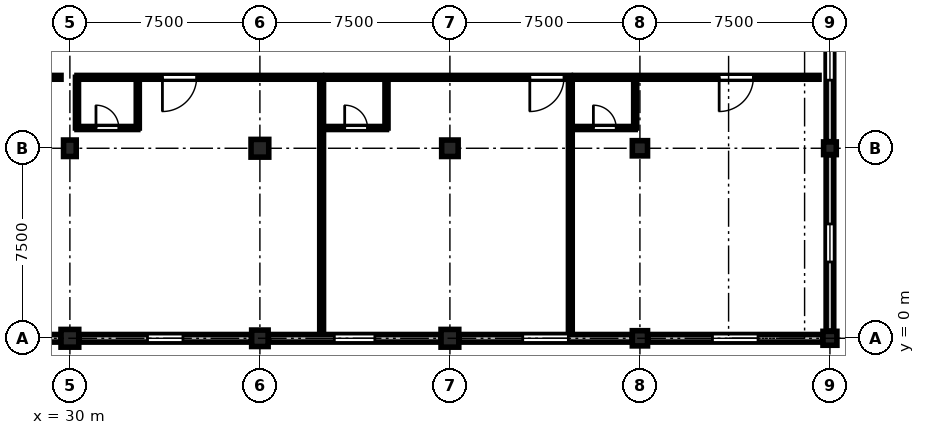
"""IFC4 building model, lengths in metres.
Left out: names, types, materials, properties, quantities, classifications, styles, units other than length and angle.
Written with IfcOpenShell. Run it as: python <this file> out.ifc"""

import sys

from ifc_helpers import new_model, si_unit, direction, frame, frame_2d, origin, origin_2d, place, context, subcontext, project, spatial, rectangle, extrude, element, fill, save


model = new_model("IFC4")
c1 = context("Model", 3, precision=1e-05, world=origin(), true_north=direction((0.0, 1.0)))
c2 = subcontext(c1, "Body", "Model", "MODEL_VIEW")
j1 = project(units=[si_unit("LENGTHUNIT", "METRE"), si_unit("PLANEANGLEUNIT", "RADIAN")], contexts=[c1])
p1 = place(None, origin())
s1 = spatial("IfcSite", under=j1, at=p1, CompositionType="ELEMENT")
p2 = place(p1, origin())
s2 = spatial("IfcBuilding", under=s1, at=p2, CompositionType="ELEMENT")
p3 = place(p2, frame((0.0, 0.0, 14.1)))
s3 = spatial("IfcBuildingStorey", under=s2, at=p3, CompositionType="ELEMENT", Elevation=14.1)
p4 = place(p3, frame((30.0, 0.0, 0.0), z_axis=(0.0, 0.0, 1.0), x_axis=(1.0, 0.0, 0.0)))
e1 = element("IfcColumn", 1, at=p4, inside=s3, PredefinedType="COLUMN", context=c2, shape_type="SweptSolid", body=[
    extrude(rectangle(XDim=0.7, YDim=0.7, at=origin_2d()), origin(), (0.0, 0.0, 1.0), 3.75),
])
p5 = place(p3, frame((30.0, 7.5, 0.0), z_axis=(0.0, 0.0, 1.0), x_axis=(1.0, 0.0, 0.0)))
e2 = element("IfcColumn", 2, at=p5, inside=s3, PredefinedType="COLUMN", context=c2, shape_type="SweptSolid", body=[
    extrude(rectangle(XDim=0.5, YDim=0.65, at=origin_2d()), origin(), (0.0, 0.0, 1.0), 3.75),
])
p6 = place(p3, frame((37.5, 0.0, 0.0), z_axis=(0.0, 0.0, 1.0), x_axis=(1.0, 0.0, 0.0)))
e3 = element("IfcColumn", 3, at=p6, inside=s3, PredefinedType="COLUMN", context=c2, shape_type="SweptSolid", body=[
    extrude(rectangle(XDim=0.65, YDim=0.65, at=origin_2d()), origin(), (0.0, 0.0, 1.0), 3.75),
])
for number, where, z_axis, x_axis in (
    (4, (37.5, 7.5, 0.0), (0.0, 0.0, 1.0), (1.0, 0.0, 0.0)),
    (5, (45.0, 0.0, 0.0), (0.0, 0.0, 1.0), (1.0, 0.0, 0.0)),
):
    element("IfcColumn", number, at=place(p3, frame(where, z_axis=z_axis, x_axis=x_axis)), inside=s3, PredefinedType="COLUMN", context=c2, shape_type="SweptSolid", body=[
        extrude(rectangle(XDim=0.7, YDim=0.7, at=origin_2d()), origin(), (0.0, 0.0, 1.0), 3.75),
    ])
p7 = place(p3, frame((45.0, 7.5, 0.0), z_axis=(0.0, 0.0, 1.0), x_axis=(1.0, 0.0, 0.0)))
e6 = element("IfcColumn", 6, at=p7, inside=s3, PredefinedType="COLUMN", context=c2, shape_type="SweptSolid", body=[
    extrude(rectangle(XDim=0.65, YDim=0.65, at=origin_2d()), origin(), (0.0, 0.0, 1.0), 3.75),
])
for number, where, z_axis, x_axis in (
    (7, (52.5, 0.0, 0.0), (0.0, 0.0, 1.0), (1.0, 0.0, 0.0)),
    (8, (52.5, 7.5, 0.0), (0.0, 0.0, 1.0), (1.0, 0.0, 0.0)),
):
    element("IfcColumn", number, at=place(p3, frame(where, z_axis=z_axis, x_axis=x_axis)), inside=s3, PredefinedType="COLUMN", context=c2, shape_type="SweptSolid", body=[
        extrude(rectangle(XDim=0.6, YDim=0.6, at=origin_2d()), origin(), (0.0, 0.0, 1.0), 3.75),
    ])
p8 = place(p3, frame((60.0, 0.0, 0.0), z_axis=(0.0, 0.0, 1.0), x_axis=(1.0, 0.0, 0.0)))
e9 = element("IfcColumn", 9, at=p8, inside=s3, PredefinedType="COLUMN", context=c2, shape_type="SweptSolid", body=[
    extrude(rectangle(XDim=0.55, YDim=0.55, at=origin_2d()), origin(), (0.0, 0.0, 1.0), 3.75),
])
p9 = place(p3, frame((60.0, 7.5, 0.0), z_axis=(0.0, 0.0, 1.0), x_axis=(1.0, 0.0, 0.0)))
e10 = element("IfcColumn", 10, at=p9, inside=s3, PredefinedType="COLUMN", context=c2, shape_type="SweptSolid", body=[
    extrude(rectangle(XDim=0.5, YDim=0.5, at=origin_2d()), origin(), (0.0, 0.0, 1.0), 3.75),
])
p10 = place(p3, frame((29.64, 0.0, 0.0), z_axis=(0.0, 0.0, 1.0), x_axis=(-1.0, 0.0, 0.0)))
e11 = element("IfcWall", 11, at=p10, inside=s3, PredefinedType="STANDARD", context=c2, shape_type="SweptSolid", body=[
    extrude(rectangle(XDim=6.805, YDim=0.3, at=frame_2d((3.402, 0.0))), origin(), (0.0, 0.0, 1.0), 2.87),
])
p11 = place(p10, frame((2.302, 0.0, 0.9)))
e12 = element("IfcOpeningElement", 12, at=p11, cuts=e11, PredefinedType="OPENING", context=c2, shape_type="SweptSolid", body=[
    extrude(rectangle(XDim=2.2, YDim=1.69, at=frame_2d((1.1, 0.845))), frame((0.0, 0.16, 0.0), z_axis=(0.0, -1.0, 0.0), x_axis=(1.0, 0.0, 0.0)), (0.0, 0.0, 1.0), 0.32),
])
p12 = place(p3, frame((37.165, 0.0, 0.0), z_axis=(0.0, 0.0, 1.0), x_axis=(-1.0, 0.0, 0.0)))
e13 = element("IfcWall", 13, at=p12, inside=s3, PredefinedType="STANDARD", context=c2, shape_type="SweptSolid", body=[
    extrude(rectangle(XDim=6.805, YDim=0.3, at=frame_2d((3.402, 0.0))), origin(), (0.0, 0.0, 1.0), 2.87),
])
p13 = place(p12, frame((2.702, 0.0, 0.9)))
e14 = element("IfcOpeningElement", 14, at=p13, cuts=e13, PredefinedType="OPENING", context=c2, shape_type="SweptSolid", body=[
    extrude(rectangle(XDim=1.4, YDim=1.69, at=frame_2d((0.7, 0.845))), frame((0.0, 0.16, 0.0), z_axis=(0.0, -1.0, 0.0), x_axis=(1.0, 0.0, 0.0)), (0.0, 0.0, 1.0), 0.32),
])
p14 = place(p3, frame((44.64, 0.0, 0.0), z_axis=(0.0, 0.0, 1.0), x_axis=(-1.0, 0.0, 0.0)))
e15 = element("IfcWall", 15, at=p14, inside=s3, PredefinedType="STANDARD", context=c2, shape_type="SweptSolid", body=[
    extrude(rectangle(XDim=6.805, YDim=0.3, at=frame_2d((3.402, 0.0))), origin(), (0.0, 0.0, 1.0), 2.87),
])
p15 = place(p14, frame((2.603, 0.0, 0.9)))
e16 = element("IfcOpeningElement", 16, at=p15, cuts=e15, PredefinedType="OPENING", context=c2, shape_type="SweptSolid", body=[
    extrude(rectangle(XDim=1.6, YDim=1.69, at=frame_2d((0.8, 0.845))), frame((0.0, 0.16, 0.0), z_axis=(0.0, -1.0, 0.0), x_axis=(1.0, 0.0, 0.0)), (0.0, 0.0, 1.0), 0.32),
])
p16 = place(p3, frame((52.19, 0.0, 0.0), z_axis=(0.0, 0.0, 1.0), x_axis=(-1.0, 0.0, 0.0)))
e17 = element("IfcWall", 17, at=p16, inside=s3, PredefinedType="STANDARD", context=c2, shape_type="SweptSolid", body=[
    extrude(rectangle(XDim=6.83, YDim=0.3, at=frame_2d((3.415, 0.0))), origin(), (0.0, 0.0, 1.0), 2.87),
])
p17 = place(p16, frame((2.515, 0.0, 0.9)))
e18 = element("IfcOpeningElement", 18, at=p17, cuts=e17, PredefinedType="OPENING", context=c2, shape_type="SweptSolid", body=[
    extrude(rectangle(XDim=1.8, YDim=1.69, at=frame_2d((0.9, 0.845))), frame((0.0, 0.16, 0.0), z_axis=(0.0, -1.0, 0.0), x_axis=(1.0, 0.0, 0.0)), (0.0, 0.0, 1.0), 0.32),
])
p18 = place(p3, frame((59.715, 0.0, 0.0), z_axis=(0.0, 0.0, 1.0), x_axis=(-1.0, 0.0, 0.0)))
e19 = element("IfcWall", 19, at=p18, inside=s3, PredefinedType="STANDARD", context=c2, shape_type="SweptSolid", body=[
    extrude(rectangle(XDim=6.905, YDim=0.3, at=frame_2d((3.453, 0.0))), origin(), (0.0, 0.0, 1.0), 2.87),
])
p19 = place(p18, frame((2.552, 0.0, 0.9)))
e20 = element("IfcOpeningElement", 20, at=p19, cuts=e19, PredefinedType="OPENING", context=c2, shape_type="SweptSolid", body=[
    extrude(rectangle(XDim=1.8, YDim=1.69, at=frame_2d((0.9, 0.845))), frame((0.0, 0.16, 0.0), z_axis=(0.0, -1.0, 0.0), x_axis=(1.0, 0.0, 0.0)), (0.0, 0.0, 1.0), 0.32),
])
p20 = place(p3, frame((60.0, 7.24, 0.0), z_axis=(0.0, 0.0, 1.0), x_axis=(0.0, -1.0, 0.0)))
e21 = element("IfcWall", 21, at=p20, inside=s3, PredefinedType="STANDARD", context=c2, shape_type="SweptSolid", body=[
    extrude(rectangle(XDim=6.955, YDim=0.3, at=frame_2d((3.478, 0.0))), origin(), (0.0, 0.0, 1.0), 2.87),
])
p21 = place(p20, frame((2.728, 0.0, 0.9)))
e22 = element("IfcOpeningElement", 22, at=p21, cuts=e21, PredefinedType="OPENING", context=c2, shape_type="SweptSolid", body=[
    extrude(rectangle(XDim=1.5, YDim=1.69, at=frame_2d((0.75, 0.845))), frame((0.0, 0.16, 0.0), z_axis=(0.0, -1.0, 0.0), x_axis=(1.0, 0.0, 0.0)), (0.0, 0.0, 1.0), 0.32),
])
p22 = place(p3, frame((60.0, 14.715, 0.0), z_axis=(0.0, 0.0, 1.0), x_axis=(0.0, -1.0, 0.0)))
e23 = element("IfcWall", 23, at=p22, inside=s3, PredefinedType="STANDARD", context=c2, shape_type="SweptSolid", body=[
    extrude(rectangle(XDim=6.955, YDim=0.3, at=frame_2d((3.478, 0.0))), origin(), (0.0, 0.0, 1.0), 2.87),
])
p23 = place(p22, frame((2.427, 0.0, 0.9)))
e24 = element("IfcOpeningElement", 24, at=p23, cuts=e23, PredefinedType="OPENING", context=c2, shape_type="SweptSolid", body=[
    extrude(rectangle(XDim=2.1, YDim=1.69, at=frame_2d((1.05, 0.845))), frame((0.0, 0.16, 0.0), z_axis=(0.0, -1.0, 0.0), x_axis=(1.0, 0.0, 0.0)), (0.0, 0.0, 1.0), 0.32),
])
p24 = place(p3, frame((39.937, 10.3, 0.0), z_axis=(0.0, 0.0, 1.0), x_axis=(-1.0, 0.0, 0.0)))
e25 = element("IfcWall", 25, at=p24, inside=s3, PredefinedType="PARTITIONING", context=c2, shape_type="SweptSolid", body=[
    extrude(rectangle(XDim=9.657, YDim=0.15, at=frame_2d((4.828, 0.0))), origin(), (0.0, 0.0, 1.0), 3.455),
])
p25 = place(p24, frame((4.934, 0.0, 0.0)))
e26 = element("IfcOpeningElement", 26, at=p25, cuts=e25, PredefinedType="OPENING", context=c2, shape_type="SweptSolid", body=[
    extrude(rectangle(XDim=1.35, YDim=2.25, at=frame_2d((0.675, 1.125))), frame((0.0, 0.085, 0.0), z_axis=(0.0, -1.0, 0.0), x_axis=(1.0, 0.0, 0.0)), (0.0, 0.0, 1.0), 0.17),
])
p26 = place(p3, frame((30.28, 8.3, 0.0), z_axis=(0.0, 0.0, 1.0), x_axis=(1.0, 0.0, 0.0)))
e27 = element("IfcWall", 27, at=p26, inside=s3, PredefinedType="PARTITIONING", context=c2, shape_type="SweptSolid", body=[
    extrude(rectangle(XDim=2.4, YDim=0.12, at=frame_2d((1.2, 0.0))), origin(), (0.0, 0.0, 1.0), 3.455),
])
p27 = place(p26, frame((0.75, 0.0, 0.0)))
e28 = element("IfcOpeningElement", 28, at=p27, cuts=e27, PredefinedType="OPENING", context=c2, shape_type="SweptSolid", body=[
    extrude(rectangle(XDim=0.9, YDim=2.1, at=frame_2d((0.45, 1.05))), frame((0.0, 0.07, 0.0), z_axis=(0.0, -1.0, 0.0), x_axis=(1.0, 0.0, 0.0)), (0.0, 0.0, 1.0), 0.14),
])
p28 = place(p3, frame((32.68, 8.3, 0.0), z_axis=(0.0, 0.0, 1.0), x_axis=(0.0, 1.0, 0.0)))
e29 = element("IfcWall", 29, at=p28, inside=s3, PredefinedType="PARTITIONING", context=c2, shape_type="SweptSolid", body=[
    extrude(rectangle(XDim=2.0, YDim=0.12, at=frame_2d((1.0, 0.0))), origin(), (0.0, 0.0, 1.0), 3.455),
])
p29 = place(p3, frame((49.753, 10.3, 0.0), z_axis=(0.0, 0.0, 1.0), x_axis=(-1.0, 0.0, 0.0)))
e30 = element("IfcWall", 30, at=p29, inside=s3, PredefinedType="PARTITIONING", context=c2, shape_type="SweptSolid", body=[
    extrude(rectangle(XDim=9.657, YDim=0.15, at=frame_2d((4.828, 0.0))), origin(), (0.0, 0.0, 1.0), 3.455),
])
p30 = place(p29, frame((0.25, 0.0, 0.0)))
e31 = element("IfcOpeningElement", 31, at=p30, cuts=e30, PredefinedType="OPENING", context=c2, shape_type="SweptSolid", body=[
    extrude(rectangle(XDim=1.35, YDim=2.25, at=frame_2d((0.675, 1.125))), frame((0.0, 0.085, 0.0), z_axis=(0.0, -1.0, 0.0), x_axis=(1.0, 0.0, 0.0)), (0.0, 0.0, 1.0), 0.17),
])
p31 = place(p3, frame((40.097, 8.3, 0.0), z_axis=(0.0, 0.0, 1.0), x_axis=(1.0, 0.0, 0.0)))
e32 = element("IfcWall", 32, at=p31, inside=s3, PredefinedType="PARTITIONING", context=c2, shape_type="SweptSolid", body=[
    extrude(rectangle(XDim=2.4, YDim=0.12, at=frame_2d((1.2, 0.0))), origin(), (0.0, 0.0, 1.0), 3.455),
])
p32 = place(p31, frame((0.75, 0.0, 0.0)))
e33 = element("IfcOpeningElement", 33, at=p32, cuts=e32, PredefinedType="OPENING", context=c2, shape_type="SweptSolid", body=[
    extrude(rectangle(XDim=0.9, YDim=2.1, at=frame_2d((0.45, 1.05))), frame((0.0, 0.07, 0.0), z_axis=(0.0, -1.0, 0.0), x_axis=(1.0, 0.0, 0.0)), (0.0, 0.0, 1.0), 0.14),
])
p33 = place(p3, frame((42.497, 8.3, 0.0), z_axis=(0.0, 0.0, 1.0), x_axis=(0.0, 1.0, 0.0)))
e34 = element("IfcWall", 34, at=p33, inside=s3, PredefinedType="PARTITIONING", context=c2, shape_type="SweptSolid", body=[
    extrude(rectangle(XDim=2.0, YDim=0.12, at=frame_2d((1.0, 0.0))), origin(), (0.0, 0.0, 1.0), 3.455),
])
p34 = place(p3, frame((59.57, 10.3, 0.0), z_axis=(0.0, 0.0, 1.0), x_axis=(-1.0, 0.0, 0.0)))
e35 = element("IfcWall", 35, at=p34, inside=s3, PredefinedType="PARTITIONING", context=c2, shape_type="SweptSolid", body=[
    extrude(rectangle(XDim=9.657, YDim=0.15, at=frame_2d((4.828, 0.0))), origin(), (0.0, 0.0, 1.0), 3.455),
])
p35 = place(p34, frame((2.592, 0.0, 0.0)))
e36 = element("IfcOpeningElement", 36, at=p35, cuts=e35, PredefinedType="OPENING", context=c2, shape_type="SweptSolid", body=[
    extrude(rectangle(XDim=1.35, YDim=2.25, at=frame_2d((0.675, 1.125))), frame((0.0, 0.085, 0.0), z_axis=(0.0, -1.0, 0.0), x_axis=(1.0, 0.0, 0.0)), (0.0, 0.0, 1.0), 0.17),
])
p36 = place(p3, frame((49.913, 8.3, 0.0), z_axis=(0.0, 0.0, 1.0), x_axis=(1.0, 0.0, 0.0)))
e37 = element("IfcWall", 37, at=p36, inside=s3, PredefinedType="PARTITIONING", context=c2, shape_type="SweptSolid", body=[
    extrude(rectangle(XDim=2.4, YDim=0.12, at=frame_2d((1.2, 0.0))), origin(), (0.0, 0.0, 1.0), 3.455),
])
p37 = place(p36, frame((0.75, 0.0, 0.0)))
e38 = element("IfcOpeningElement", 38, at=p37, cuts=e37, PredefinedType="OPENING", context=c2, shape_type="SweptSolid", body=[
    extrude(rectangle(XDim=0.9, YDim=2.1, at=frame_2d((0.45, 1.05))), frame((0.0, 0.07, 0.0), z_axis=(0.0, -1.0, 0.0), x_axis=(1.0, 0.0, 0.0)), (0.0, 0.0, 1.0), 0.14),
])
p38 = place(p3, frame((52.313, 8.3, 0.0), z_axis=(0.0, 0.0, 1.0), x_axis=(0.0, 1.0, 0.0)))
e39 = element("IfcWall", 39, at=p38, inside=s3, PredefinedType="PARTITIONING", context=c2, shape_type="SweptSolid", body=[
    extrude(rectangle(XDim=2.0, YDim=0.12, at=frame_2d((1.0, 0.0))), origin(), (0.0, 0.0, 1.0), 2.905),
])
p39 = place(p3, frame((18.45, 10.3, 0.0), z_axis=(0.0, 0.0, 1.0), x_axis=(1.0, 0.0, 0.0)))
e40 = element("IfcWall", 40, at=p39, inside=s3, PredefinedType="PARTITIONING", context=c2, shape_type="SweptSolid", body=[
    extrude(rectangle(XDim=11.2, YDim=0.15, at=frame_2d((5.6, 0.0))), origin(), (0.0, 0.0, 1.0), 3.455),
])
for number, where, z_axis, x_axis in (
    (41, (39.937, 0.35, 0.0), (0.0, 0.0, 1.0), (0.0, 1.0, 0.0)),
    (42, (49.753, 0.35, 0.0), (0.0, 0.0, 1.0), (0.0, 1.0, 0.0)),
):
    element("IfcWall", number, at=place(p3, frame(where, z_axis=z_axis, x_axis=x_axis)), inside=s3, PredefinedType="PARTITIONING", context=c2, shape_type="SweptSolid", body=[
        extrude(rectangle(XDim=9.95, YDim=0.15, at=frame_2d((4.975, 0.0))), origin(), (0.0, 0.0, 1.0), 3.455),
    ])
p40 = place(p3, frame((30.28, 8.3, 0.0), z_axis=(0.0, 0.0, 1.0), x_axis=(0.0, 1.0, 0.0)))
e43 = element("IfcWall", 43, at=p40, inside=s3, PredefinedType="PARTITIONING", context=c2, shape_type="SweptSolid", body=[
    extrude(rectangle(XDim=2.0, YDim=0.12, at=frame_2d((1.0, 0.0))), origin(), (0.0, 0.0, 1.0), 2.955),
])
p41 = place(p13, origin())
e44 = element("IfcWindow", 44, at=p41, inside=s3, PartitioningType="SINGLE_PANEL", PredefinedType="WINDOW", context=c2, shape_type="SweptSolid", body=[
    extrude(rectangle(XDim=1.4, YDim=1.69, at=frame_2d((0.7, 0.845))), frame((0.0, 0.03, 0.0), z_axis=(0.0, -1.0, 0.0), x_axis=(1.0, 0.0, 0.0)), (0.0, 0.0, 1.0), 0.06),
])
fill(e14, e44)
p42 = place(p15, origin())
e45 = element("IfcWindow", 45, at=p42, inside=s3, PartitioningType="SINGLE_PANEL", PredefinedType="WINDOW", context=c2, shape_type="SweptSolid", body=[
    extrude(rectangle(XDim=1.6, YDim=1.69, at=frame_2d((0.8, 0.845))), frame((0.0, 0.03, 0.0), z_axis=(0.0, -1.0, 0.0), x_axis=(1.0, 0.0, 0.0)), (0.0, 0.0, 1.0), 0.06),
])
fill(e16, e45)
p43 = place(p17, origin())
e46 = element("IfcWindow", 46, at=p43, inside=s3, PartitioningType="SINGLE_PANEL", PredefinedType="WINDOW", context=c2, shape_type="SweptSolid", body=[
    extrude(rectangle(XDim=1.8, YDim=1.69, at=frame_2d((0.9, 0.845))), frame((0.0, 0.03, 0.0), z_axis=(0.0, -1.0, 0.0), x_axis=(1.0, 0.0, 0.0)), (0.0, 0.0, 1.0), 0.06),
])
fill(e18, e46)
p44 = place(p19, origin())
e47 = element("IfcWindow", 47, at=p44, inside=s3, PartitioningType="SINGLE_PANEL", PredefinedType="WINDOW", context=c2, shape_type="SweptSolid", body=[
    extrude(rectangle(XDim=1.8, YDim=1.69, at=frame_2d((0.9, 0.845))), frame((0.0, 0.03, 0.0), z_axis=(0.0, -1.0, 0.0), x_axis=(1.0, 0.0, 0.0)), (0.0, 0.0, 1.0), 0.06),
])
fill(e20, e47)
p45 = place(p21, origin())
e48 = element("IfcWindow", 48, at=p45, inside=s3, PartitioningType="SINGLE_PANEL", PredefinedType="WINDOW", context=c2, shape_type="SweptSolid", body=[
    extrude(rectangle(XDim=1.5, YDim=1.69, at=frame_2d((0.75, 0.845))), frame((0.0, 0.03, 0.0), z_axis=(0.0, -1.0, 0.0), x_axis=(1.0, 0.0, 0.0)), (0.0, 0.0, 1.0), 0.06),
])
fill(e22, e48)
p46 = place(p23, origin())
e49 = element("IfcWindow", 49, at=p46, inside=s3, PartitioningType="SINGLE_PANEL", PredefinedType="WINDOW", context=c2, shape_type="SweptSolid", body=[
    extrude(rectangle(XDim=2.1, YDim=1.69, at=frame_2d((1.05, 0.845))), frame((0.0, 0.03, 0.0), z_axis=(0.0, -1.0, 0.0), x_axis=(1.0, 0.0, 0.0)), (0.0, 0.0, 1.0), 0.06),
])
fill(e24, e49)
p47 = place(p25, origin())
e50 = element("IfcDoor", 50, at=p47, inside=s3, OperationType="SINGLE_SWING_RIGHT", PredefinedType="DOOR", context=c2, shape_type="SweptSolid", body=[
    extrude(rectangle(XDim=1.35, YDim=2.25, at=frame_2d((0.675, 1.125))), frame((0.0, 0.025, 0.0), z_axis=(0.0, -1.0, 0.0), x_axis=(1.0, 0.0, 0.0)), (0.0, 0.0, 1.0), 0.05),
])
fill(e26, e50)
p48 = place(p27, origin())
e51 = element("IfcDoor", 51, at=p48, inside=s3, OperationType="SINGLE_SWING_LEFT", PredefinedType="DOOR", context=c2, shape_type="SweptSolid", body=[
    extrude(rectangle(XDim=0.9, YDim=2.1, at=frame_2d((0.45, 1.05))), frame((0.0, 0.025, 0.0), z_axis=(0.0, -1.0, 0.0), x_axis=(1.0, 0.0, 0.0)), (0.0, 0.0, 1.0), 0.05),
])
fill(e28, e51)
p49 = place(p30, origin())
e52 = element("IfcDoor", 52, at=p49, inside=s3, OperationType="SINGLE_SWING_RIGHT", PredefinedType="DOOR", context=c2, shape_type="SweptSolid", body=[
    extrude(rectangle(XDim=1.35, YDim=2.25, at=frame_2d((0.675, 1.125))), frame((0.0, 0.025, 0.0), z_axis=(0.0, -1.0, 0.0), x_axis=(1.0, 0.0, 0.0)), (0.0, 0.0, 1.0), 0.05),
])
fill(e31, e52)
p50 = place(p32, origin())
e53 = element("IfcDoor", 53, at=p50, inside=s3, OperationType="SINGLE_SWING_LEFT", PredefinedType="DOOR", context=c2, shape_type="SweptSolid", body=[
    extrude(rectangle(XDim=0.9, YDim=2.1, at=frame_2d((0.45, 1.05))), frame((0.0, 0.025, 0.0), z_axis=(0.0, -1.0, 0.0), x_axis=(1.0, 0.0, 0.0)), (0.0, 0.0, 1.0), 0.05),
])
fill(e33, e53)
p51 = place(p35, origin())
e54 = element("IfcDoor", 54, at=p51, inside=s3, OperationType="SINGLE_SWING_RIGHT", PredefinedType="DOOR", context=c2, shape_type="SweptSolid", body=[
    extrude(rectangle(XDim=1.35, YDim=2.25, at=frame_2d((0.675, 1.125))), frame((0.0, 0.025, 0.0), z_axis=(0.0, -1.0, 0.0), x_axis=(1.0, 0.0, 0.0)), (0.0, 0.0, 1.0), 0.05),
])
fill(e36, e54)
p52 = place(p37, origin())
e55 = element("IfcDoor", 55, at=p52, inside=s3, OperationType="SINGLE_SWING_LEFT", PredefinedType="DOOR", context=c2, shape_type="SweptSolid", body=[
    extrude(rectangle(XDim=0.9, YDim=2.1, at=frame_2d((0.45, 1.05))), frame((0.0, 0.025, 0.0), z_axis=(0.0, -1.0, 0.0), x_axis=(1.0, 0.0, 0.0)), (0.0, 0.0, 1.0), 0.05),
])
fill(e38, e55)
save(model, sys.argv[1])
